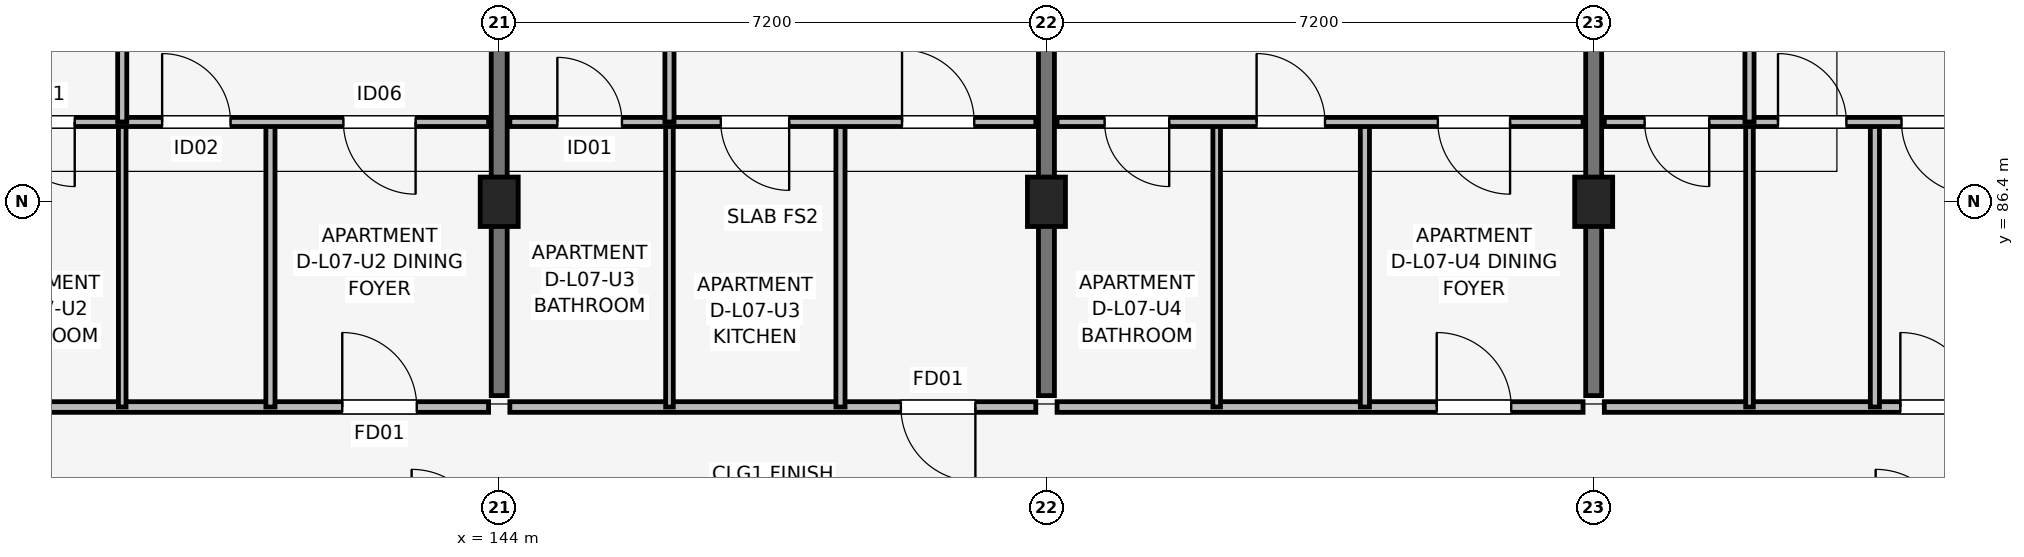
"""IFC4 building model, lengths in metres.
Left out: names, types, materials, properties, quantities, classifications, styles, units other than length and angle.
Written with IfcOpenShell. Run it as: python <this file> out.ifc"""

import sys

from ifc_helpers import new_model, si_unit, direction, frame, frame_2d, origin, origin_2d, place, context, subcontext, project, spatial, rectangle, extrude, element, fill, save


model = new_model("IFC4")
c1 = context("Model", 3, precision=1e-05, world=origin(), true_north=direction((0.0, 1.0)))
c2 = subcontext(c1, "Body", "Model", "MODEL_VIEW")
j1 = project(units=[si_unit("LENGTHUNIT", "METRE"), si_unit("PLANEANGLEUNIT", "RADIAN")], contexts=[c1])
p1 = place(None, origin())
s1 = spatial("IfcSite", under=j1, at=p1, CompositionType="ELEMENT")
p2 = place(p1, origin())
s2 = spatial("IfcBuilding", under=s1, at=p2, CompositionType="ELEMENT")
p3 = place(p2, frame((0.0, 0.0, 24.45)))
s3 = spatial("IfcBuildingStorey", under=s2, at=p3, CompositionType="ELEMENT", Elevation=24.45)
for number, where, z_axis, x_axis in (
    (1, (144.0, 86.4, 0.0), (0.0, 0.0, 1.0), (1.0, 0.0, 0.0)),
    (2, (151.2, 86.4, 0.0), (0.0, 0.0, 1.0), (1.0, 0.0, 0.0)),
    (3, (158.4, 86.4, 0.0), (0.0, 0.0, 1.0), (1.0, 0.0, 0.0)),
):
    element("IfcColumn", number, at=place(p3, frame(where, z_axis=z_axis, x_axis=x_axis)), inside=s3, PredefinedType="COLUMN", context=c2, shape_type="SweptSolid", body=[
        extrude(rectangle(XDim=0.5, YDim=0.65, at=origin_2d()), origin(), (0.0, 0.0, 1.0), 3.15),
    ])
for number, where, z_axis, x_axis in (
    (4, (144.0, 83.85, 0.0), (0.0, 0.0, 1.0), (0.0, 1.0, 0.0)),
    (5, (151.2, 83.85, 0.0), (0.0, 0.0, 1.0), (0.0, 1.0, 0.0)),
    (6, (158.4, 83.85, 0.0), (0.0, 0.0, 1.0), (0.0, 1.0, 0.0)),
):
    element("IfcWall", number, at=place(p3, frame(where, z_axis=z_axis, x_axis=x_axis)), inside=s3, PredefinedType="SHEAR", context=c2, shape_type="SweptSolid", body=[
        extrude(rectangle(XDim=9.4, YDim=0.21, at=frame_2d((4.7, 0.0))), origin(), (0.0, 0.0, 1.0), 3.15),
    ])
p4 = place(p3, frame((136.94, 83.7, 0.0), z_axis=(0.0, 0.0, 1.0), x_axis=(1.0, 0.0, 0.0)))
e7 = element("IfcWall", 7, at=p4, inside=s3, PredefinedType="PARTITIONING", context=c2, shape_type="SweptSolid", body=[
    extrude(rectangle(XDim=6.92, YDim=0.14, at=frame_2d((3.46, 0.0))), origin(), (0.0, 0.0, 1.0), 2.38),
])
p5 = place(p4, frame((4.995, 0.0, 0.0)))
e8 = element("IfcOpeningElement", 8, at=p5, cuts=e7, PredefinedType="OPENING", context=c2, shape_type="SweptSolid", body=[
    extrude(rectangle(XDim=0.98, YDim=2.1, at=frame_2d((0.49, 1.05))), frame((0.0, 0.08, 0.0), z_axis=(0.0, -1.0, 0.0), x_axis=(1.0, 0.0, 0.0)), (0.0, 0.0, 1.0), 0.16),
])
p6 = place(p3, frame((139.04, 83.7, 0.0), z_axis=(0.0, 0.0, 1.0), x_axis=(0.0, 1.0, 0.0)))
e9 = element("IfcWall", 9, at=p6, inside=s3, PredefinedType="PARTITIONING", context=c2, shape_type="SweptSolid", body=[
    extrude(rectangle(XDim=3.75, YDim=0.1, at=frame_2d((1.875, 0.0))), origin(), (0.0, 0.0, 1.0), 2.38),
])
p7 = place(p3, frame((140.99, 83.7, 0.0), z_axis=(0.0, 0.0, 1.0), x_axis=(0.0, 1.0, 0.0)))
e10 = element("IfcWall", 10, at=p7, inside=s3, PredefinedType="PARTITIONING", context=c2, shape_type="SweptSolid", body=[
    extrude(rectangle(XDim=3.75, YDim=0.12, at=frame_2d((1.875, 0.0))), origin(), (0.0, 0.0, 1.0), 2.38),
])
p8 = place(p3, frame((136.94, 87.45, 0.0), z_axis=(0.0, 0.0, 1.0), x_axis=(1.0, 0.0, 0.0)))
e11 = element("IfcWall", 11, at=p8, inside=s3, PredefinedType="PARTITIONING", context=c2, shape_type="SweptSolid", body=[
    extrude(rectangle(XDim=6.92, YDim=0.12, at=frame_2d((3.46, 0.0))), origin(), (0.0, 0.0, 1.0), 2.38),
])
p9 = place(p8, frame((1.475, 0.0, 0.0), z_axis=(0.0, 0.0, 1.0), x_axis=(-1.0, 0.0, 0.0)))
e12 = element("IfcOpeningElement", 12, at=p9, cuts=e11, PredefinedType="OPENING", context=c2, shape_type="SweptSolid", body=[
    extrude(rectangle(XDim=0.85, YDim=2.08, at=frame_2d((0.425, 1.04))), frame((0.0, 0.07, 0.0), z_axis=(0.0, -1.0, 0.0), x_axis=(1.0, 0.0, 0.0)), (0.0, 0.0, 1.0), 0.14),
])
p10 = place(p8, frame((2.625, 0.0, 0.0)))
e13 = element("IfcOpeningElement", 13, at=p10, cuts=e11, PredefinedType="OPENING", context=c2, shape_type="SweptSolid", body=[
    extrude(rectangle(XDim=0.9, YDim=2.08, at=frame_2d((0.45, 1.04))), frame((0.0, 0.07, 0.0), z_axis=(0.0, -1.0, 0.0), x_axis=(1.0, 0.0, 0.0)), (0.0, 0.0, 1.0), 0.14),
])
p11 = place(p8, frame((5.96, 0.0, 0.0), z_axis=(0.0, 0.0, 1.0), x_axis=(-1.0, 0.0, 0.0)))
e14 = element("IfcOpeningElement", 14, at=p11, cuts=e11, PredefinedType="OPENING", context=c2, shape_type="SweptSolid", body=[
    extrude(rectangle(XDim=0.95, YDim=2.08, at=frame_2d((0.475, 1.04))), frame((0.0, 0.07, 0.0), z_axis=(0.0, -1.0, 0.0), x_axis=(1.0, 0.0, 0.0)), (0.0, 0.0, 1.0), 0.14),
])
p12 = place(p3, frame((139.04, 87.45, 0.0), z_axis=(0.0, 0.0, 1.0), x_axis=(0.0, 1.0, 0.0)))
e15 = element("IfcWall", 15, at=p12, inside=s3, PredefinedType="PARTITIONING", context=c2, shape_type="SweptSolid", body=[
    extrude(rectangle(XDim=5.85, YDim=0.12, at=frame_2d((2.925, 0.0))), origin(), (0.0, 0.0, 1.0), 2.38),
])
p13 = place(p12, frame((2.475, 0.0, 0.0)))
e16 = element("IfcOpeningElement", 16, at=p13, cuts=e15, PredefinedType="OPENING", context=c2, shape_type="SweptSolid", body=[
    extrude(rectangle(XDim=0.9, YDim=2.08, at=frame_2d((0.45, 1.04))), frame((0.0, 0.07, 0.0), z_axis=(0.0, -1.0, 0.0), x_axis=(1.0, 0.0, 0.0)), (0.0, 0.0, 1.0), 0.14),
])
p14 = place(p3, frame((144.14, 83.7, 0.0), z_axis=(0.0, 0.0, 1.0), x_axis=(1.0, 0.0, 0.0)))
e17 = element("IfcWall", 17, at=p14, inside=s3, PredefinedType="PARTITIONING", context=c2, shape_type="SweptSolid", body=[
    extrude(rectangle(XDim=6.92, YDim=0.14, at=frame_2d((3.46, 0.0))), origin(), (0.0, 0.0, 1.0), 2.38),
])
p15 = place(p14, frame((6.125, 0.0, 0.0), z_axis=(0.0, 0.0, 1.0), x_axis=(-1.0, 0.0, 0.0)))
e18 = element("IfcOpeningElement", 18, at=p15, cuts=e17, PredefinedType="OPENING", context=c2, shape_type="SweptSolid", body=[
    extrude(rectangle(XDim=0.98, YDim=2.1, at=frame_2d((0.49, 1.05))), frame((0.0, 0.08, 0.0), z_axis=(0.0, -1.0, 0.0), x_axis=(1.0, 0.0, 0.0)), (0.0, 0.0, 1.0), 0.16),
])
p16 = place(p3, frame((146.24, 83.7, 0.0), z_axis=(0.0, 0.0, 1.0), x_axis=(0.0, 1.0, 0.0)))
e19 = element("IfcWall", 19, at=p16, inside=s3, PredefinedType="PARTITIONING", context=c2, shape_type="SweptSolid", body=[
    extrude(rectangle(XDim=3.75, YDim=0.1, at=frame_2d((1.875, 0.0))), origin(), (0.0, 0.0, 1.0), 2.38),
])
p17 = place(p3, frame((148.49, 83.7, 0.0), z_axis=(0.0, 0.0, 1.0), x_axis=(0.0, 1.0, 0.0)))
e20 = element("IfcWall", 20, at=p17, inside=s3, PredefinedType="PARTITIONING", context=c2, shape_type="SweptSolid", body=[
    extrude(rectangle(XDim=3.75, YDim=0.12, at=frame_2d((1.875, 0.0))), origin(), (0.0, 0.0, 1.0), 2.38),
])
p18 = place(p3, frame((144.14, 87.45, 0.0), z_axis=(0.0, 0.0, 1.0), x_axis=(1.0, 0.0, 0.0)))
e21 = element("IfcWall", 21, at=p18, inside=s3, PredefinedType="PARTITIONING", context=c2, shape_type="SweptSolid", body=[
    extrude(rectangle(XDim=6.92, YDim=0.12, at=frame_2d((3.46, 0.0))), origin(), (0.0, 0.0, 1.0), 2.38),
])
p19 = place(p18, frame((0.625, 0.0, 0.0)))
e22 = element("IfcOpeningElement", 22, at=p19, cuts=e21, PredefinedType="OPENING", context=c2, shape_type="SweptSolid", body=[
    extrude(rectangle(XDim=0.85, YDim=2.08, at=frame_2d((0.425, 1.04))), frame((0.0, 0.07, 0.0), z_axis=(0.0, -1.0, 0.0), x_axis=(1.0, 0.0, 0.0)), (0.0, 0.0, 1.0), 0.14),
])
p20 = place(p18, frame((3.675, 0.0, 0.0), z_axis=(0.0, 0.0, 1.0), x_axis=(-1.0, 0.0, 0.0)))
e23 = element("IfcOpeningElement", 23, at=p20, cuts=e21, PredefinedType="OPENING", context=c2, shape_type="SweptSolid", body=[
    extrude(rectangle(XDim=0.9, YDim=2.08, at=frame_2d((0.45, 1.04))), frame((0.0, 0.07, 0.0), z_axis=(0.0, -1.0, 0.0), x_axis=(1.0, 0.0, 0.0)), (0.0, 0.0, 1.0), 0.14),
])
p21 = place(p18, frame((5.16, 0.0, 0.0)))
e24 = element("IfcOpeningElement", 24, at=p21, cuts=e21, PredefinedType="OPENING", context=c2, shape_type="SweptSolid", body=[
    extrude(rectangle(XDim=0.95, YDim=2.08, at=frame_2d((0.475, 1.04))), frame((0.0, 0.07, 0.0), z_axis=(0.0, -1.0, 0.0), x_axis=(1.0, 0.0, 0.0)), (0.0, 0.0, 1.0), 0.14),
])
p22 = place(p3, frame((146.24, 87.45, 0.0), z_axis=(0.0, 0.0, 1.0), x_axis=(0.0, 1.0, 0.0)))
e25 = element("IfcWall", 25, at=p22, inside=s3, PredefinedType="PARTITIONING", context=c2, shape_type="SweptSolid", body=[
    extrude(rectangle(XDim=5.85, YDim=0.12, at=frame_2d((2.925, 0.0))), origin(), (0.0, 0.0, 1.0), 2.38),
])
p23 = place(p22, frame((3.375, 0.0, 0.0), z_axis=(0.0, 0.0, 1.0), x_axis=(-1.0, 0.0, 0.0)))
e26 = element("IfcOpeningElement", 26, at=p23, cuts=e25, PredefinedType="OPENING", context=c2, shape_type="SweptSolid", body=[
    extrude(rectangle(XDim=0.9, YDim=2.08, at=frame_2d((0.45, 1.04))), frame((0.0, 0.07, 0.0), z_axis=(0.0, -1.0, 0.0), x_axis=(1.0, 0.0, 0.0)), (0.0, 0.0, 1.0), 0.14),
])
p24 = place(p3, frame((151.34, 83.7, 0.0), z_axis=(0.0, 0.0, 1.0), x_axis=(1.0, 0.0, 0.0)))
e27 = element("IfcWall", 27, at=p24, inside=s3, PredefinedType="PARTITIONING", context=c2, shape_type="SweptSolid", body=[
    extrude(rectangle(XDim=6.92, YDim=0.14, at=frame_2d((3.46, 0.0))), origin(), (0.0, 0.0, 1.0), 2.38),
])
p25 = place(p24, frame((4.995, 0.0, 0.0)))
e28 = element("IfcOpeningElement", 28, at=p25, cuts=e27, PredefinedType="OPENING", context=c2, shape_type="SweptSolid", body=[
    extrude(rectangle(XDim=0.98, YDim=2.1, at=frame_2d((0.49, 1.05))), frame((0.0, 0.08, 0.0), z_axis=(0.0, -1.0, 0.0), x_axis=(1.0, 0.0, 0.0)), (0.0, 0.0, 1.0), 0.16),
])
p26 = place(p3, frame((153.44, 83.7, 0.0), z_axis=(0.0, 0.0, 1.0), x_axis=(0.0, 1.0, 0.0)))
e29 = element("IfcWall", 29, at=p26, inside=s3, PredefinedType="PARTITIONING", context=c2, shape_type="SweptSolid", body=[
    extrude(rectangle(XDim=3.75, YDim=0.1, at=frame_2d((1.875, 0.0))), origin(), (0.0, 0.0, 1.0), 2.38),
])
p27 = place(p3, frame((155.39, 83.7, 0.0), z_axis=(0.0, 0.0, 1.0), x_axis=(0.0, 1.0, 0.0)))
e30 = element("IfcWall", 30, at=p27, inside=s3, PredefinedType="PARTITIONING", context=c2, shape_type="SweptSolid", body=[
    extrude(rectangle(XDim=3.75, YDim=0.12, at=frame_2d((1.875, 0.0))), origin(), (0.0, 0.0, 1.0), 2.38),
])
p28 = place(p3, frame((151.34, 87.45, 0.0), z_axis=(0.0, 0.0, 1.0), x_axis=(1.0, 0.0, 0.0)))
e31 = element("IfcWall", 31, at=p28, inside=s3, PredefinedType="PARTITIONING", context=c2, shape_type="SweptSolid", body=[
    extrude(rectangle(XDim=6.92, YDim=0.12, at=frame_2d((3.46, 0.0))), origin(), (0.0, 0.0, 1.0), 2.38),
])
p29 = place(p28, frame((1.475, 0.0, 0.0), z_axis=(0.0, 0.0, 1.0), x_axis=(-1.0, 0.0, 0.0)))
e32 = element("IfcOpeningElement", 32, at=p29, cuts=e31, PredefinedType="OPENING", context=c2, shape_type="SweptSolid", body=[
    extrude(rectangle(XDim=0.85, YDim=2.08, at=frame_2d((0.425, 1.04))), frame((0.0, 0.07, 0.0), z_axis=(0.0, -1.0, 0.0), x_axis=(1.0, 0.0, 0.0)), (0.0, 0.0, 1.0), 0.14),
])
p30 = place(p28, frame((2.625, 0.0, 0.0)))
e33 = element("IfcOpeningElement", 33, at=p30, cuts=e31, PredefinedType="OPENING", context=c2, shape_type="SweptSolid", body=[
    extrude(rectangle(XDim=0.9, YDim=2.08, at=frame_2d((0.45, 1.04))), frame((0.0, 0.07, 0.0), z_axis=(0.0, -1.0, 0.0), x_axis=(1.0, 0.0, 0.0)), (0.0, 0.0, 1.0), 0.14),
])
p31 = place(p28, frame((5.96, 0.0, 0.0), z_axis=(0.0, 0.0, 1.0), x_axis=(-1.0, 0.0, 0.0)))
e34 = element("IfcOpeningElement", 34, at=p31, cuts=e31, PredefinedType="OPENING", context=c2, shape_type="SweptSolid", body=[
    extrude(rectangle(XDim=0.95, YDim=2.08, at=frame_2d((0.475, 1.04))), frame((0.0, 0.07, 0.0), z_axis=(0.0, -1.0, 0.0), x_axis=(1.0, 0.0, 0.0)), (0.0, 0.0, 1.0), 0.14),
])
p32 = place(p3, frame((158.54, 83.7, 0.0), z_axis=(0.0, 0.0, 1.0), x_axis=(1.0, 0.0, 0.0)))
e35 = element("IfcWall", 35, at=p32, inside=s3, PredefinedType="PARTITIONING", context=c2, shape_type="SweptSolid", body=[
    extrude(rectangle(XDim=6.92, YDim=0.14, at=frame_2d((3.46, 0.0))), origin(), (0.0, 0.0, 1.0), 2.38),
])
p33 = place(p32, frame((3.895, 0.0, 0.0)))
e36 = element("IfcOpeningElement", 36, at=p33, cuts=e35, PredefinedType="OPENING", context=c2, shape_type="SweptSolid", body=[
    extrude(rectangle(XDim=0.98, YDim=2.1, at=frame_2d((0.49, 1.05))), frame((0.0, 0.08, 0.0), z_axis=(0.0, -1.0, 0.0), x_axis=(1.0, 0.0, 0.0)), (0.0, 0.0, 1.0), 0.16),
])
p34 = place(p3, frame((160.45, 83.7, 0.0), z_axis=(0.0, 0.0, 1.0), x_axis=(0.0, 1.0, 0.0)))
e37 = element("IfcWall", 37, at=p34, inside=s3, PredefinedType="PARTITIONING", context=c2, shape_type="SweptSolid", body=[
    extrude(rectangle(XDim=3.75, YDim=0.1, at=frame_2d((1.875, 0.0))), origin(), (0.0, 0.0, 1.0), 2.38),
])
p35 = place(p3, frame((162.1, 83.7, 0.0), z_axis=(0.0, 0.0, 1.0), x_axis=(0.0, 1.0, 0.0)))
e38 = element("IfcWall", 38, at=p35, inside=s3, PredefinedType="PARTITIONING", context=c2, shape_type="SweptSolid", body=[
    extrude(rectangle(XDim=3.75, YDim=0.12, at=frame_2d((1.875, 0.0))), origin(), (0.0, 0.0, 1.0), 2.38),
])
p36 = place(p3, frame((158.54, 87.45, 0.0), z_axis=(0.0, 0.0, 1.0), x_axis=(1.0, 0.0, 0.0)))
e39 = element("IfcWall", 39, at=p36, inside=s3, PredefinedType="PARTITIONING", context=c2, shape_type="SweptSolid", body=[
    extrude(rectangle(XDim=6.92, YDim=0.12, at=frame_2d((3.46, 0.0))), origin(), (0.0, 0.0, 1.0), 2.38),
])
p37 = place(p36, frame((1.38, 0.0, 0.0), z_axis=(0.0, 0.0, 1.0), x_axis=(-1.0, 0.0, 0.0)))
e40 = element("IfcOpeningElement", 40, at=p37, cuts=e39, PredefinedType="OPENING", context=c2, shape_type="SweptSolid", body=[
    extrude(rectangle(XDim=0.85, YDim=2.08, at=frame_2d((0.425, 1.04))), frame((0.0, 0.07, 0.0), z_axis=(0.0, -1.0, 0.0), x_axis=(1.0, 0.0, 0.0)), (0.0, 0.0, 1.0), 0.14),
])
p38 = place(p36, frame((2.285, 0.0, 0.0)))
e41 = element("IfcOpeningElement", 41, at=p38, cuts=e39, PredefinedType="OPENING", context=c2, shape_type="SweptSolid", body=[
    extrude(rectangle(XDim=0.9, YDim=2.08, at=frame_2d((0.45, 1.04))), frame((0.0, 0.07, 0.0), z_axis=(0.0, -1.0, 0.0), x_axis=(1.0, 0.0, 0.0)), (0.0, 0.0, 1.0), 0.14),
])
p39 = place(p36, frame((4.86, 0.0, 0.0), z_axis=(0.0, 0.0, 1.0), x_axis=(-1.0, 0.0, 0.0)))
e42 = element("IfcOpeningElement", 42, at=p39, cuts=e39, PredefinedType="OPENING", context=c2, shape_type="SweptSolid", body=[
    extrude(rectangle(XDim=0.95, YDim=2.08, at=frame_2d((0.475, 1.04))), frame((0.0, 0.07, 0.0), z_axis=(0.0, -1.0, 0.0), x_axis=(1.0, 0.0, 0.0)), (0.0, 0.0, 1.0), 0.14),
])
p40 = place(p3, frame((160.45, 87.45, 0.0), z_axis=(0.0, 0.0, 1.0), x_axis=(0.0, 1.0, 0.0)))
e43 = element("IfcWall", 43, at=p40, inside=s3, PredefinedType="PARTITIONING", context=c2, shape_type="SweptSolid", body=[
    extrude(rectangle(XDim=5.85, YDim=0.12, at=frame_2d((2.925, 0.0))), origin(), (0.0, 0.0, 1.0), 2.38),
])
p41 = place(p40, frame((2.475, 0.0, 0.0)))
e44 = element("IfcOpeningElement", 44, at=p41, cuts=e43, PredefinedType="OPENING", context=c2, shape_type="SweptSolid", body=[
    extrude(rectangle(XDim=0.9, YDim=2.08, at=frame_2d((0.45, 1.04))), frame((0.0, 0.07, 0.0), z_axis=(0.0, -1.0, 0.0), x_axis=(1.0, 0.0, 0.0)), (0.0, 0.0, 1.0), 0.14),
])
p42 = place(p5, origin())
e45 = element("IfcDoor", 45, at=p42, inside=s3, OperationType="SINGLE_SWING_LEFT", PredefinedType="DOOR", context=c2, shape_type="SweptSolid", body=[
    extrude(rectangle(XDim=0.98, YDim=2.1, at=frame_2d((0.49, 1.05))), frame((0.0, 0.025, 0.0), z_axis=(0.0, -1.0, 0.0), x_axis=(1.0, 0.0, 0.0)), (0.0, 0.0, 1.0), 0.05),
])
fill(e8, e45)
p43 = place(p9, origin())
e46 = element("IfcDoor", 46, at=p43, inside=s3, OperationType="SINGLE_SWING_RIGHT", PredefinedType="DOOR", context=c2, shape_type="SweptSolid", body=[
    extrude(rectangle(XDim=0.85, YDim=2.08, at=frame_2d((0.425, 1.04))), frame((0.0, 0.025, 0.0), z_axis=(0.0, -1.0, 0.0), x_axis=(1.0, 0.0, 0.0)), (0.0, 0.0, 1.0), 0.05),
])
fill(e12, e46)
p44 = place(p10, origin())
e47 = element("IfcDoor", 47, at=p44, inside=s3, OperationType="SINGLE_SWING_LEFT", PredefinedType="DOOR", context=c2, shape_type="SweptSolid", body=[
    extrude(rectangle(XDim=0.9, YDim=2.08, at=frame_2d((0.45, 1.04))), frame((0.0, 0.025, 0.0), z_axis=(0.0, -1.0, 0.0), x_axis=(1.0, 0.0, 0.0)), (0.0, 0.0, 1.0), 0.05),
])
fill(e13, e47)
p45 = place(p11, origin())
e48 = element("IfcDoor", 48, at=p45, inside=s3, OperationType="SINGLE_SWING_RIGHT", PredefinedType="DOOR", context=c2, shape_type="SweptSolid", body=[
    extrude(rectangle(XDim=0.95, YDim=2.08, at=frame_2d((0.475, 1.04))), frame((0.0, 0.025, 0.0), z_axis=(0.0, -1.0, 0.0), x_axis=(1.0, 0.0, 0.0)), (0.0, 0.0, 1.0), 0.05),
])
fill(e14, e48)
p46 = place(p15, origin())
e49 = element("IfcDoor", 49, at=p46, inside=s3, OperationType="SINGLE_SWING_RIGHT", PredefinedType="DOOR", context=c2, shape_type="SweptSolid", body=[
    extrude(rectangle(XDim=0.98, YDim=2.1, at=frame_2d((0.49, 1.05))), frame((0.0, 0.025, 0.0), z_axis=(0.0, -1.0, 0.0), x_axis=(1.0, 0.0, 0.0)), (0.0, 0.0, 1.0), 0.05),
])
fill(e18, e49)
p47 = place(p19, origin())
e50 = element("IfcDoor", 50, at=p47, inside=s3, OperationType="SINGLE_SWING_LEFT", PredefinedType="DOOR", context=c2, shape_type="SweptSolid", body=[
    extrude(rectangle(XDim=0.85, YDim=2.08, at=frame_2d((0.425, 1.04))), frame((0.0, 0.025, 0.0), z_axis=(0.0, -1.0, 0.0), x_axis=(1.0, 0.0, 0.0)), (0.0, 0.0, 1.0), 0.05),
])
fill(e22, e50)
p48 = place(p20, origin())
e51 = element("IfcDoor", 51, at=p48, inside=s3, OperationType="SINGLE_SWING_RIGHT", PredefinedType="DOOR", context=c2, shape_type="SweptSolid", body=[
    extrude(rectangle(XDim=0.9, YDim=2.08, at=frame_2d((0.45, 1.04))), frame((0.0, 0.025, 0.0), z_axis=(0.0, -1.0, 0.0), x_axis=(1.0, 0.0, 0.0)), (0.0, 0.0, 1.0), 0.05),
])
fill(e23, e51)
p49 = place(p21, origin())
e52 = element("IfcDoor", 52, at=p49, inside=s3, OperationType="SINGLE_SWING_LEFT", PredefinedType="DOOR", context=c2, shape_type="SweptSolid", body=[
    extrude(rectangle(XDim=0.95, YDim=2.08, at=frame_2d((0.475, 1.04))), frame((0.0, 0.025, 0.0), z_axis=(0.0, -1.0, 0.0), x_axis=(1.0, 0.0, 0.0)), (0.0, 0.0, 1.0), 0.05),
])
fill(e24, e52)
p50 = place(p25, origin())
e53 = element("IfcDoor", 53, at=p50, inside=s3, OperationType="SINGLE_SWING_LEFT", PredefinedType="DOOR", context=c2, shape_type="SweptSolid", body=[
    extrude(rectangle(XDim=0.98, YDim=2.1, at=frame_2d((0.49, 1.05))), frame((0.0, 0.025, 0.0), z_axis=(0.0, -1.0, 0.0), x_axis=(1.0, 0.0, 0.0)), (0.0, 0.0, 1.0), 0.05),
])
fill(e28, e53)
p51 = place(p29, origin())
e54 = element("IfcDoor", 54, at=p51, inside=s3, OperationType="SINGLE_SWING_RIGHT", PredefinedType="DOOR", context=c2, shape_type="SweptSolid", body=[
    extrude(rectangle(XDim=0.85, YDim=2.08, at=frame_2d((0.425, 1.04))), frame((0.0, 0.025, 0.0), z_axis=(0.0, -1.0, 0.0), x_axis=(1.0, 0.0, 0.0)), (0.0, 0.0, 1.0), 0.05),
])
fill(e32, e54)
p52 = place(p30, origin())
e55 = element("IfcDoor", 55, at=p52, inside=s3, OperationType="SINGLE_SWING_LEFT", PredefinedType="DOOR", context=c2, shape_type="SweptSolid", body=[
    extrude(rectangle(XDim=0.9, YDim=2.08, at=frame_2d((0.45, 1.04))), frame((0.0, 0.025, 0.0), z_axis=(0.0, -1.0, 0.0), x_axis=(1.0, 0.0, 0.0)), (0.0, 0.0, 1.0), 0.05),
])
fill(e33, e55)
p53 = place(p31, origin())
e56 = element("IfcDoor", 56, at=p53, inside=s3, OperationType="SINGLE_SWING_RIGHT", PredefinedType="DOOR", context=c2, shape_type="SweptSolid", body=[
    extrude(rectangle(XDim=0.95, YDim=2.08, at=frame_2d((0.475, 1.04))), frame((0.0, 0.025, 0.0), z_axis=(0.0, -1.0, 0.0), x_axis=(1.0, 0.0, 0.0)), (0.0, 0.0, 1.0), 0.05),
])
fill(e34, e56)
p54 = place(p33, origin())
e57 = element("IfcDoor", 57, at=p54, inside=s3, OperationType="SINGLE_SWING_LEFT", PredefinedType="DOOR", context=c2, shape_type="SweptSolid", body=[
    extrude(rectangle(XDim=0.98, YDim=2.1, at=frame_2d((0.49, 1.05))), frame((0.0, 0.025, 0.0), z_axis=(0.0, -1.0, 0.0), x_axis=(1.0, 0.0, 0.0)), (0.0, 0.0, 1.0), 0.05),
])
fill(e36, e57)
p55 = place(p37, origin())
e58 = element("IfcDoor", 58, at=p55, inside=s3, OperationType="SINGLE_SWING_RIGHT", PredefinedType="DOOR", context=c2, shape_type="SweptSolid", body=[
    extrude(rectangle(XDim=0.85, YDim=2.08, at=frame_2d((0.425, 1.04))), frame((0.0, 0.025, 0.0), z_axis=(0.0, -1.0, 0.0), x_axis=(1.0, 0.0, 0.0)), (0.0, 0.0, 1.0), 0.05),
])
fill(e40, e58)
p56 = place(p38, origin())
e59 = element("IfcDoor", 59, at=p56, inside=s3, OperationType="SINGLE_SWING_LEFT", PredefinedType="DOOR", context=c2, shape_type="SweptSolid", body=[
    extrude(rectangle(XDim=0.9, YDim=2.08, at=frame_2d((0.45, 1.04))), frame((0.0, 0.025, 0.0), z_axis=(0.0, -1.0, 0.0), x_axis=(1.0, 0.0, 0.0)), (0.0, 0.0, 1.0), 0.05),
])
fill(e41, e59)
p57 = place(p39, origin())
e60 = element("IfcDoor", 60, at=p57, inside=s3, OperationType="SINGLE_SWING_RIGHT", PredefinedType="DOOR", context=c2, shape_type="SweptSolid", body=[
    extrude(rectangle(XDim=0.95, YDim=2.08, at=frame_2d((0.475, 1.04))), frame((0.0, 0.025, 0.0), z_axis=(0.0, -1.0, 0.0), x_axis=(1.0, 0.0, 0.0)), (0.0, 0.0, 1.0), 0.05),
])
fill(e42, e60)
save(model, sys.argv[1])
